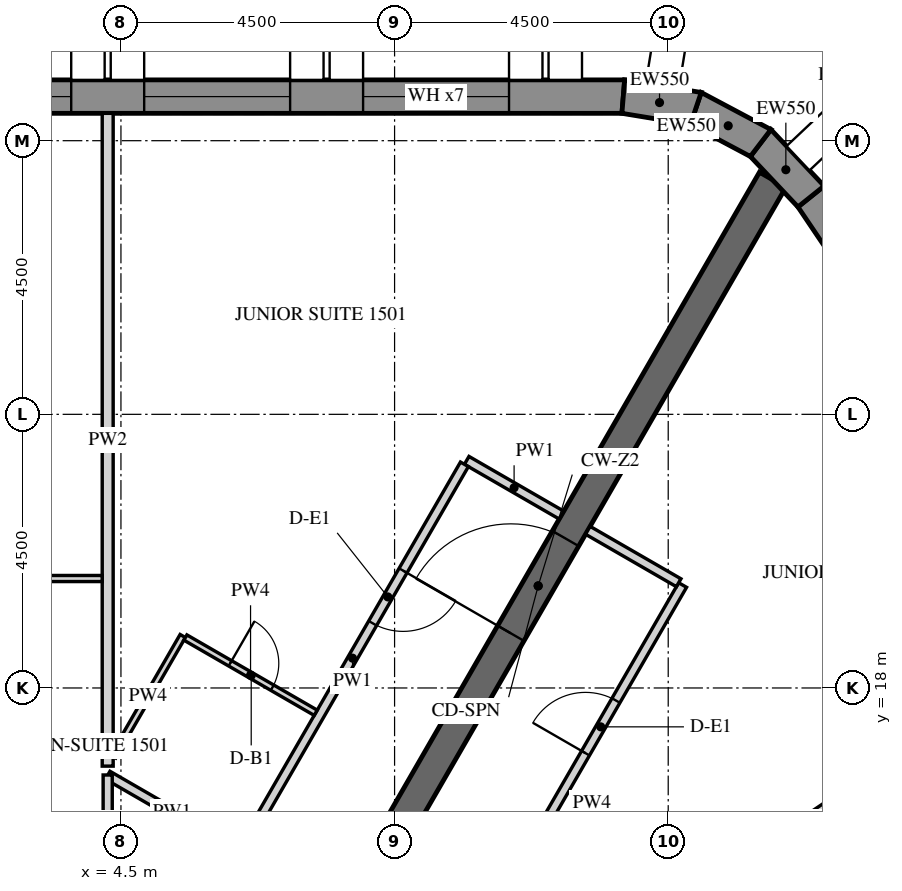
"""IFC4 building model, lengths in metres.
Left out: names, types, materials, properties, quantities, classifications, styles, units other than length and angle.
Written with IfcOpenShell. Run it as: python <this file> out.ifc"""

import sys

from ifc_helpers import new_model, si_unit, direction, frame, frame_2d, origin, place, context, subcontext, project, spatial, polyline, rectangle, outline, extrude, element, fill, save


model = new_model("IFC4")
c1 = context("Model", 3, precision=1e-05, world=origin(), true_north=direction((0.0, 1.0)))
c2 = subcontext(c1, "Body", "Model", "MODEL_VIEW")
j1 = project(units=[si_unit("LENGTHUNIT", "METRE"), si_unit("PLANEANGLEUNIT", "RADIAN")], contexts=[c1])
p1 = place(None, origin())
s1 = spatial("IfcSite", under=j1, at=p1, CompositionType="ELEMENT")
p2 = place(p1, origin())
s2 = spatial("IfcBuilding", under=s1, at=p2, CompositionType="ELEMENT")
p3 = place(p2, frame((0.0, 0.0, 195.6)))
s3 = spatial("IfcBuildingStorey", under=s2, at=p3, CompositionType="ELEMENT", Elevation=195.6)
p4 = place(p3, frame((12.761, 27.725, -0.15), z_axis=(0.0, 0.0, 1.0), x_axis=(-1.0, 0.0, 0.0)))
e1 = element("IfcWall", 1, at=p4, inside=s3, PredefinedType="SOLIDWALL", context=c2, shape_type="SweptSolid", body=[
    extrude(outline(polyline([(-0.022, -0.275), (27.783, -0.275), (27.732, 0.275), (0.022, 0.275), (-0.022, -0.275)])), origin(), (0.0, 0.0, 1.0), 3.9),
])
p5 = place(p4, frame((1.879, 0.0, 1.05)))
e2 = element("IfcOpeningElement", 2, at=p5, cuts=e1, PredefinedType="OPENING", context=c2, shape_type="SweptSolid", body=[
    extrude(rectangle(XDim=2.4, YDim=2.4, at=frame_2d((1.2, 1.2))), frame((0.0, 0.285, 0.0), z_axis=(0.0, -1.0, 0.0), x_axis=(1.0, 0.0, 0.0)), (0.0, 0.0, 1.0), 0.57),
])
p6 = place(p4, frame((5.479, 0.0, 1.05)))
e3 = element("IfcOpeningElement", 3, at=p6, cuts=e1, PredefinedType="OPENING", context=c2, shape_type="SweptSolid", body=[
    extrude(rectangle(XDim=2.4, YDim=2.4, at=frame_2d((1.2, 1.2))), frame((0.0, 0.285, 0.0), z_axis=(0.0, -1.0, 0.0), x_axis=(1.0, 0.0, 0.0)), (0.0, 0.0, 1.0), 0.57),
])
p7 = place(p4, frame((9.079, 0.0, 1.05)))
e4 = element("IfcOpeningElement", 4, at=p7, cuts=e1, PredefinedType="OPENING", context=c2, shape_type="SweptSolid", body=[
    extrude(rectangle(XDim=2.4, YDim=2.4, at=frame_2d((1.2, 1.2))), frame((0.0, 0.285, 0.0), z_axis=(0.0, -1.0, 0.0), x_axis=(1.0, 0.0, 0.0)), (0.0, 0.0, 1.0), 0.57),
])
p8 = place(p4, frame((12.679, 0.0, 1.05)))
e5 = element("IfcOpeningElement", 5, at=p8, cuts=e1, PredefinedType="OPENING", context=c2, shape_type="SweptSolid", body=[
    extrude(rectangle(XDim=2.4, YDim=2.4, at=frame_2d((1.2, 1.2))), frame((0.0, 0.285, 0.0), z_axis=(0.0, -1.0, 0.0), x_axis=(1.0, 0.0, 0.0)), (0.0, 0.0, 1.0), 0.57),
])
p9 = place(p4, frame((16.279, 0.0, 1.05)))
e6 = element("IfcOpeningElement", 6, at=p9, cuts=e1, PredefinedType="OPENING", context=c2, shape_type="SweptSolid", body=[
    extrude(rectangle(XDim=2.4, YDim=2.4, at=frame_2d((1.2, 1.2))), frame((0.0, 0.285, 0.0), z_axis=(0.0, -1.0, 0.0), x_axis=(1.0, 0.0, 0.0)), (0.0, 0.0, 1.0), 0.57),
])
p10 = place(p4, frame((19.879, 0.0, 1.05)))
e7 = element("IfcOpeningElement", 7, at=p10, cuts=e1, PredefinedType="OPENING", context=c2, shape_type="SweptSolid", body=[
    extrude(rectangle(XDim=2.4, YDim=2.4, at=frame_2d((1.2, 1.2))), frame((0.0, 0.285, 0.0), z_axis=(0.0, -1.0, 0.0), x_axis=(1.0, 0.0, 0.0)), (0.0, 0.0, 1.0), 0.57),
])
p11 = place(p4, frame((23.479, 0.0, 1.05)))
e8 = element("IfcOpeningElement", 8, at=p11, cuts=e1, PredefinedType="OPENING", context=c2, shape_type="SweptSolid", body=[
    extrude(rectangle(XDim=2.4, YDim=2.4, at=frame_2d((1.2, 1.2))), frame((0.0, 0.285, 0.0), z_axis=(0.0, -1.0, 0.0), x_axis=(1.0, 0.0, 0.0)), (0.0, 0.0, 1.0), 0.57),
])
p12 = place(p3, frame((31.371, 3.071, -0.15), z_axis=(0.0, 0.0, 1.0), x_axis=(-0.559189891278, 0.829039604297, 0.0)))
e9 = element("IfcWall", 9, at=p12, inside=s3, PredefinedType="SOLIDWALL", context=c2, shape_type="SweptSolid", body=[
    extrude(outline(polyline([(-0.026, -0.275), (27.781, -0.275), (27.736, 0.275), (0.026, 0.275), (-0.026, -0.275)])), origin(), (0.0, 0.0, 1.0), 3.9),
])
p13 = place(p12, frame((1.879, 0.0, 1.05)))
e10 = element("IfcOpeningElement", 10, at=p13, cuts=e9, PredefinedType="OPENING", context=c2, shape_type="SweptSolid", body=[
    extrude(rectangle(XDim=2.4, YDim=2.4, at=frame_2d((1.2, 1.2))), frame((0.0, 0.285, 0.0), z_axis=(0.0, -1.0, 0.0), x_axis=(1.0, 0.0, 0.0)), (0.0, 0.0, 1.0), 0.57),
])
p14 = place(p12, frame((5.479, 0.0, 1.05)))
e11 = element("IfcOpeningElement", 11, at=p14, cuts=e9, PredefinedType="OPENING", context=c2, shape_type="SweptSolid", body=[
    extrude(rectangle(XDim=2.4, YDim=2.4, at=frame_2d((1.2, 1.2))), frame((0.0, 0.285, 0.0), z_axis=(0.0, -1.0, 0.0), x_axis=(1.0, 0.0, 0.0)), (0.0, 0.0, 1.0), 0.57),
])
p15 = place(p12, frame((9.079, 0.0, 1.05)))
e12 = element("IfcOpeningElement", 12, at=p15, cuts=e9, PredefinedType="OPENING", context=c2, shape_type="SweptSolid", body=[
    extrude(rectangle(XDim=2.4, YDim=2.4, at=frame_2d((1.2, 1.2))), frame((0.0, 0.285, 0.0), z_axis=(0.0, -1.0, 0.0), x_axis=(1.0, 0.0, 0.0)), (0.0, 0.0, 1.0), 0.57),
])
p16 = place(p12, frame((12.679, 0.0, 1.05)))
e13 = element("IfcOpeningElement", 13, at=p16, cuts=e9, PredefinedType="OPENING", context=c2, shape_type="SweptSolid", body=[
    extrude(rectangle(XDim=2.4, YDim=2.4, at=frame_2d((1.2, 1.2))), frame((0.0, 0.285, 0.0), z_axis=(0.0, -1.0, 0.0), x_axis=(1.0, 0.0, 0.0)), (0.0, 0.0, 1.0), 0.57),
])
p17 = place(p12, frame((16.279, 0.0, 1.05)))
e14 = element("IfcOpeningElement", 14, at=p17, cuts=e9, PredefinedType="OPENING", context=c2, shape_type="SweptSolid", body=[
    extrude(rectangle(XDim=2.4, YDim=2.4, at=frame_2d((1.2, 1.2))), frame((0.0, 0.285, 0.0), z_axis=(0.0, -1.0, 0.0), x_axis=(1.0, 0.0, 0.0)), (0.0, 0.0, 1.0), 0.57),
])
p18 = place(p12, frame((19.879, 0.0, 1.05)))
e15 = element("IfcOpeningElement", 15, at=p18, cuts=e9, PredefinedType="OPENING", context=c2, shape_type="SweptSolid", body=[
    extrude(rectangle(XDim=2.4, YDim=2.4, at=frame_2d((1.2, 1.2))), frame((0.0, 0.285, 0.0), z_axis=(0.0, -1.0, 0.0), x_axis=(1.0, 0.0, 0.0)), (0.0, 0.0, 1.0), 0.57),
])
p19 = place(p12, frame((23.479, 0.0, 1.05)))
e16 = element("IfcOpeningElement", 16, at=p19, cuts=e9, PredefinedType="OPENING", context=c2, shape_type="SweptSolid", body=[
    extrude(rectangle(XDim=2.4, YDim=2.4, at=frame_2d((1.2, 1.2))), frame((0.0, 0.285, 0.0), z_axis=(0.0, -1.0, 0.0), x_axis=(1.0, 0.0, 0.0)), (0.0, 0.0, 1.0), 0.57),
])
p20 = place(p3, frame((15.849, 26.083, -0.15), z_axis=(0.0, 0.0, 1.0), x_axis=(-0.686196220404, 0.727416488061, 0.0)))
e17 = element("IfcWall", 17, at=p20, inside=s3, PredefinedType="SOLIDWALL", context=c2, shape_type="SweptSolid", body=[
    extrude(outline(polyline([(-0.022, -0.275), (1.253, -0.275), (1.163, 0.275), (0.022, 0.275), (-0.022, -0.275)])), origin(), (0.0, 0.0, 1.0), 3.9),
])
p21 = place(p3, frame((15.02, 26.962, -0.15), z_axis=(0.0, 0.0, 1.0), x_axis=(-0.882950818639, 0.469465495926, 0.0)))
e18 = element("IfcWall", 18, at=p21, inside=s3, PredefinedType="SOLIDWALL", context=c2, shape_type="SweptSolid", body=[
    extrude(outline(polyline([(-0.045, -0.275), (1.253, -0.275), (1.163, 0.275), (0.045, 0.275), (-0.045, -0.275)])), origin(), (0.0, 0.0, 1.0), 3.9),
])
p22 = place(p3, frame((13.953, 27.529, -0.15), z_axis=(0.0, 0.0, 1.0), x_axis=(-0.986751945211, 0.162236243244, 0.0)))
e19 = element("IfcWall", 19, at=p22, inside=s3, PredefinedType="SOLIDWALL", context=c2, shape_type="SweptSolid", body=[
    extrude(outline(polyline([(-0.045, -0.275), (1.231, -0.275), (1.186, 0.275), (0.045, 0.275), (-0.045, -0.275)])), origin(), (0.0, 0.0, 1.0), 3.9),
])
p23 = place(p3, frame((7.506, 13.0, -0.15), z_axis=(0.0, 0.0, 1.0), x_axis=(0.499988271576, 0.866032175087, 0.0)))
e20 = element("IfcWall", 20, at=p23, inside=s3, PredefinedType="SHEAR", context=c2, shape_type="SweptSolid", body=[
    extrude(rectangle(XDim=15.424, YDim=0.5, at=frame_2d((7.712, 0.0))), origin(), (0.0, 0.0, 1.0), 3.9),
])
p24 = place(p23, frame((6.812, 0.0, 0.15)))
e21 = element("IfcOpeningElement", 21, at=p24, cuts=e20, PredefinedType="OPENING", context=c2, shape_type="SweptSolid", body=[
    extrude(rectangle(XDim=1.8, YDim=2.4, at=frame_2d((0.9, 1.2))), frame((0.0, 0.26, 0.0), z_axis=(0.0, -1.0, 0.0), x_axis=(1.0, 0.0, 0.0)), (0.0, 0.0, 1.0), 0.52),
])
p25 = place(p3, frame((11.745, 20.843, 0.0), z_axis=(0.0, 0.0, 1.0), x_axis=(-0.865989075817, 0.500062916607, 0.0)))
e22 = element("IfcWall", 22, at=p25, inside=s3, PredefinedType="PARTITIONING", context=c2, shape_type="SweptSolid", body=[
    extrude(rectangle(XDim=1.8, YDim=0.15, at=frame_2d((0.9, 0.0))), origin(), (0.0, 0.0, 1.0), 2.988),
])
p26 = place(p3, frame((10.149, 21.678, 0.0), z_axis=(0.0, 0.0, 1.0), x_axis=(-0.500020076982, -0.866013812023, 0.0)))
e23 = element("IfcWall", 23, at=p26, inside=s3, PredefinedType="PARTITIONING", context=c2, shape_type="SweptSolid", body=[
    extrude(rectangle(XDim=7.361, YDim=0.15, at=frame_2d((3.681, 0.0))), origin(), (0.0, 0.0, 1.0), 2.988),
])
p27 = place(p26, frame((2.018, 0.0, 0.0)))
e24 = element("IfcOpeningElement", 24, at=p27, cuts=e23, PredefinedType="OPENING", context=c2, shape_type="SweptSolid", body=[
    extrude(rectangle(XDim=1.0, YDim=2.1, at=frame_2d((0.5, 1.05))), frame((0.0, 0.085, 0.0), z_axis=(0.0, -1.0, 0.0), x_axis=(1.0, 0.0, 0.0)), (0.0, 0.0, 1.0), 0.17),
])
p28 = place(p3, frame((6.403, 15.341, 0.0), z_axis=(0.0, 0.0, 1.0), x_axis=(-0.8660013066, 0.500041735226, 0.0)))
e25 = element("IfcWall", 25, at=p28, inside=s3, PredefinedType="PARTITIONING", context=c2, shape_type="SweptSolid", body=[
    extrude(rectangle(XDim=2.449, YDim=0.15, at=frame_2d((1.225, 0.0))), origin(), (0.0, 0.0, 1.0), 2.988),
])
p29 = place(p3, frame((4.282, 16.569, 0.0), z_axis=(0.0, 0.0, 1.0), x_axis=(0.0, -1.0, 0.0)))
e26 = element("IfcWall", 26, at=p29, inside=s3, PredefinedType="PARTITIONING", context=c2, shape_type="SweptSolid", body=[
    extrude(rectangle(XDim=1.569, YDim=0.15, at=frame_2d((0.785, 0.0))), origin(), (0.0, 0.0, 1.0), 2.988),
])
p30 = place(p3, frame((10.056, 13.318, 0.0), z_axis=(0.0, 0.0, 1.0), x_axis=(0.499995202058, 0.86602817386, 0.0)))
e27 = element("IfcWall", 27, at=p30, inside=s3, PredefinedType="PARTITIONING", context=c2, shape_type="SweptSolid", body=[
    extrude(rectangle(XDim=7.361, YDim=0.15, at=frame_2d((3.68, 0.0))), origin(), (0.0, 0.0, 1.0), 2.988),
])
p31 = place(p30, frame((4.168, 0.0, 0.0)))
e28 = element("IfcOpeningElement", 28, at=p31, cuts=e27, PredefinedType="OPENING", context=c2, shape_type="SweptSolid", body=[
    extrude(rectangle(XDim=1.0, YDim=2.1, at=frame_2d((0.5, 1.05))), frame((0.0, 0.085, 0.0), z_axis=(0.0, -1.0, 0.0), x_axis=(1.0, 0.0, 0.0)), (0.0, 0.0, 1.0), 0.17),
])
p32 = place(p3, frame((13.672, 19.73, 0.0), z_axis=(0.0, 0.0, 1.0), x_axis=(-0.866074815912, 0.499914405916, 0.0)))
e29 = element("IfcWall", 29, at=p32, inside=s3, PredefinedType="PARTITIONING", context=c2, shape_type="SweptSolid", body=[
    extrude(rectangle(XDim=1.725, YDim=0.15, at=frame_2d((0.862, 0.0))), origin(), (0.0, 0.0, 1.0), 2.988),
])
p33 = place(p3, frame((4.372, 16.873, 0.0), z_axis=(0.0, 0.0, 1.0), x_axis=(0.500005641832, 0.866022146447, 0.0)))
e30 = element("IfcWall", 30, at=p33, inside=s3, PredefinedType="PARTITIONING", context=c2, shape_type="SweptSolid", body=[
    extrude(rectangle(XDim=2.289, YDim=0.1, at=frame_2d((1.144, 0.0))), origin(), (0.0, 0.0, 1.0), 2.988),
])
p34 = place(p3, frame((5.56, 18.83, 0.0), z_axis=(0.0, 0.0, 1.0), x_axis=(0.866006523861, -0.500032699561, 0.0)))
e31 = element("IfcWall", 31, at=p34, inside=s3, PredefinedType="PARTITIONING", context=c2, shape_type="SweptSolid", body=[
    extrude(rectangle(XDim=2.475, YDim=0.1, at=frame_2d((1.237, 0.0))), origin(), (0.0, 0.0, 1.0), 2.988),
])
p35 = place(p34, frame((0.85, 0.0, 0.0)))
e32 = element("IfcOpeningElement", 32, at=p35, cuts=e31, PredefinedType="OPENING", context=c2, shape_type="SweptSolid", body=[
    extrude(rectangle(XDim=0.8, YDim=2.1, at=frame_2d((0.4, 1.05))), frame((0.0, 0.06, 0.0), z_axis=(0.0, -1.0, 0.0), x_axis=(1.0, 0.0, 0.0)), (0.0, 0.0, 1.0), 0.12),
])
p36 = place(p3, frame((4.282, 27.45, 0.0), z_axis=(0.0, 0.0, 1.0), x_axis=(0.0, -1.0, 0.0)))
e33 = element("IfcWall", 33, at=p36, inside=s3, PredefinedType="PARTITIONING", context=c2, shape_type="SweptSolid", body=[
    extrude(rectangle(XDim=10.735, YDim=0.18, at=frame_2d((5.368, 0.0))), origin(), (0.0, 0.0, 1.0), 2.988),
])
p37 = place(p3, frame((4.192, 19.8, 0.0), z_axis=(0.0, 0.0, 1.0), x_axis=(-1.0, 0.0, 0.0)))
e34 = element("IfcWall", 34, at=p37, inside=s3, PredefinedType="PARTITIONING", context=c2, shape_type="SweptSolid", body=[
    extrude(rectangle(XDim=7.11, YDim=0.1, at=frame_2d((3.555, 0.0))), origin(), (0.0, 0.0, 1.0), 2.988),
])
p38 = place(p37, frame((3.06, 0.0, 0.0)))
e35 = element("IfcOpeningElement", 35, at=p38, cuts=e34, PredefinedType="OPENING", context=c2, shape_type="SweptSolid", body=[
    extrude(rectangle(XDim=0.9, YDim=2.1, at=frame_2d((0.45, 1.05))), frame((0.0, 0.06, 0.0), z_axis=(0.0, -1.0, 0.0), x_axis=(1.0, 0.0, 0.0)), (0.0, 0.0, 1.0), 0.12),
])
p39 = place(p3, frame((20.363, 18.9, 0.0), z_axis=(0.0, 0.0, 1.0), x_axis=(-0.82903304346, -0.559199618072, 0.0)))
e36 = element("IfcWall", 36, at=p39, inside=s3, PredefinedType="PARTITIONING", context=c2, shape_type="SweptSolid", body=[
    extrude(rectangle(XDim=11.112, YDim=0.18, at=frame_2d((5.556, 0.0))), origin(), (0.0, 0.0, 1.0), 2.988),
])
p40 = place(p5, frame((0.0, 0.205, 0.0)))
e37 = element("IfcWindow", 37, at=p40, inside=s3, PartitioningType="DOUBLE_PANEL_VERTICAL", PredefinedType="WINDOW", context=c2, shape_type="SweptSolid", body=[
    extrude(rectangle(XDim=2.4, YDim=2.4, at=frame_2d((1.2, 1.2))), frame((0.0, 0.03, 0.0), z_axis=(0.0, -1.0, 0.0), x_axis=(1.0, 0.0, 0.0)), (0.0, 0.0, 1.0), 0.06),
])
fill(e2, e37)
p41 = place(p6, frame((0.0, 0.205, 0.0)))
e38 = element("IfcWindow", 38, at=p41, inside=s3, PartitioningType="DOUBLE_PANEL_VERTICAL", PredefinedType="WINDOW", context=c2, shape_type="SweptSolid", body=[
    extrude(rectangle(XDim=2.4, YDim=2.4, at=frame_2d((1.2, 1.2))), frame((0.0, 0.03, 0.0), z_axis=(0.0, -1.0, 0.0), x_axis=(1.0, 0.0, 0.0)), (0.0, 0.0, 1.0), 0.06),
])
fill(e3, e38)
p42 = place(p7, frame((0.0, 0.205, 0.0)))
e39 = element("IfcWindow", 39, at=p42, inside=s3, PartitioningType="DOUBLE_PANEL_VERTICAL", PredefinedType="WINDOW", context=c2, shape_type="SweptSolid", body=[
    extrude(rectangle(XDim=2.4, YDim=2.4, at=frame_2d((1.2, 1.2))), frame((0.0, 0.03, 0.0), z_axis=(0.0, -1.0, 0.0), x_axis=(1.0, 0.0, 0.0)), (0.0, 0.0, 1.0), 0.06),
])
fill(e4, e39)
p43 = place(p24, origin())
e40 = element("IfcDoor", 40, at=p43, inside=s3, OperationType="DOUBLE_DOOR_SINGLE_SWING", PredefinedType="DOOR", context=c2, shape_type="SweptSolid", body=[
    extrude(rectangle(XDim=1.8, YDim=2.4, at=frame_2d((0.9, 1.2))), frame((0.0, 0.025, 0.0), z_axis=(0.0, -1.0, 0.0), x_axis=(1.0, 0.0, 0.0)), (0.0, 0.0, 1.0), 0.05),
])
fill(e21, e40)
p44 = place(p27, origin())
e41 = element("IfcDoor", 41, at=p44, inside=s3, OperationType="SINGLE_SWING_LEFT", PredefinedType="DOOR", context=c2, shape_type="SweptSolid", body=[
    extrude(rectangle(XDim=1.0, YDim=2.1, at=frame_2d((0.5, 1.05))), frame((0.0, 0.025, 0.0), z_axis=(0.0, -1.0, 0.0), x_axis=(1.0, 0.0, 0.0)), (0.0, 0.0, 1.0), 0.05),
])
fill(e24, e41)
p45 = place(p35, origin())
e42 = element("IfcDoor", 42, at=p45, inside=s3, OperationType="SINGLE_SWING_RIGHT", PredefinedType="DOOR", context=c2, shape_type="SweptSolid", body=[
    extrude(rectangle(XDim=0.8, YDim=2.1, at=frame_2d((0.4, 1.05))), frame((0.0, 0.025, 0.0), z_axis=(0.0, -1.0, 0.0), x_axis=(1.0, 0.0, 0.0)), (0.0, 0.0, 1.0), 0.05),
])
fill(e32, e42)
p46 = place(p31, origin())
e43 = element("IfcDoor", 43, at=p46, inside=s3, OperationType="SINGLE_SWING_RIGHT", PredefinedType="DOOR", context=c2, shape_type="SweptSolid", body=[
    extrude(rectangle(XDim=1.0, YDim=2.1, at=frame_2d((0.5, 1.05))), frame((0.0, 0.025, 0.0), z_axis=(0.0, -1.0, 0.0), x_axis=(1.0, 0.0, 0.0)), (0.0, 0.0, 1.0), 0.05),
])
fill(e28, e43)
save(model, sys.argv[1])
